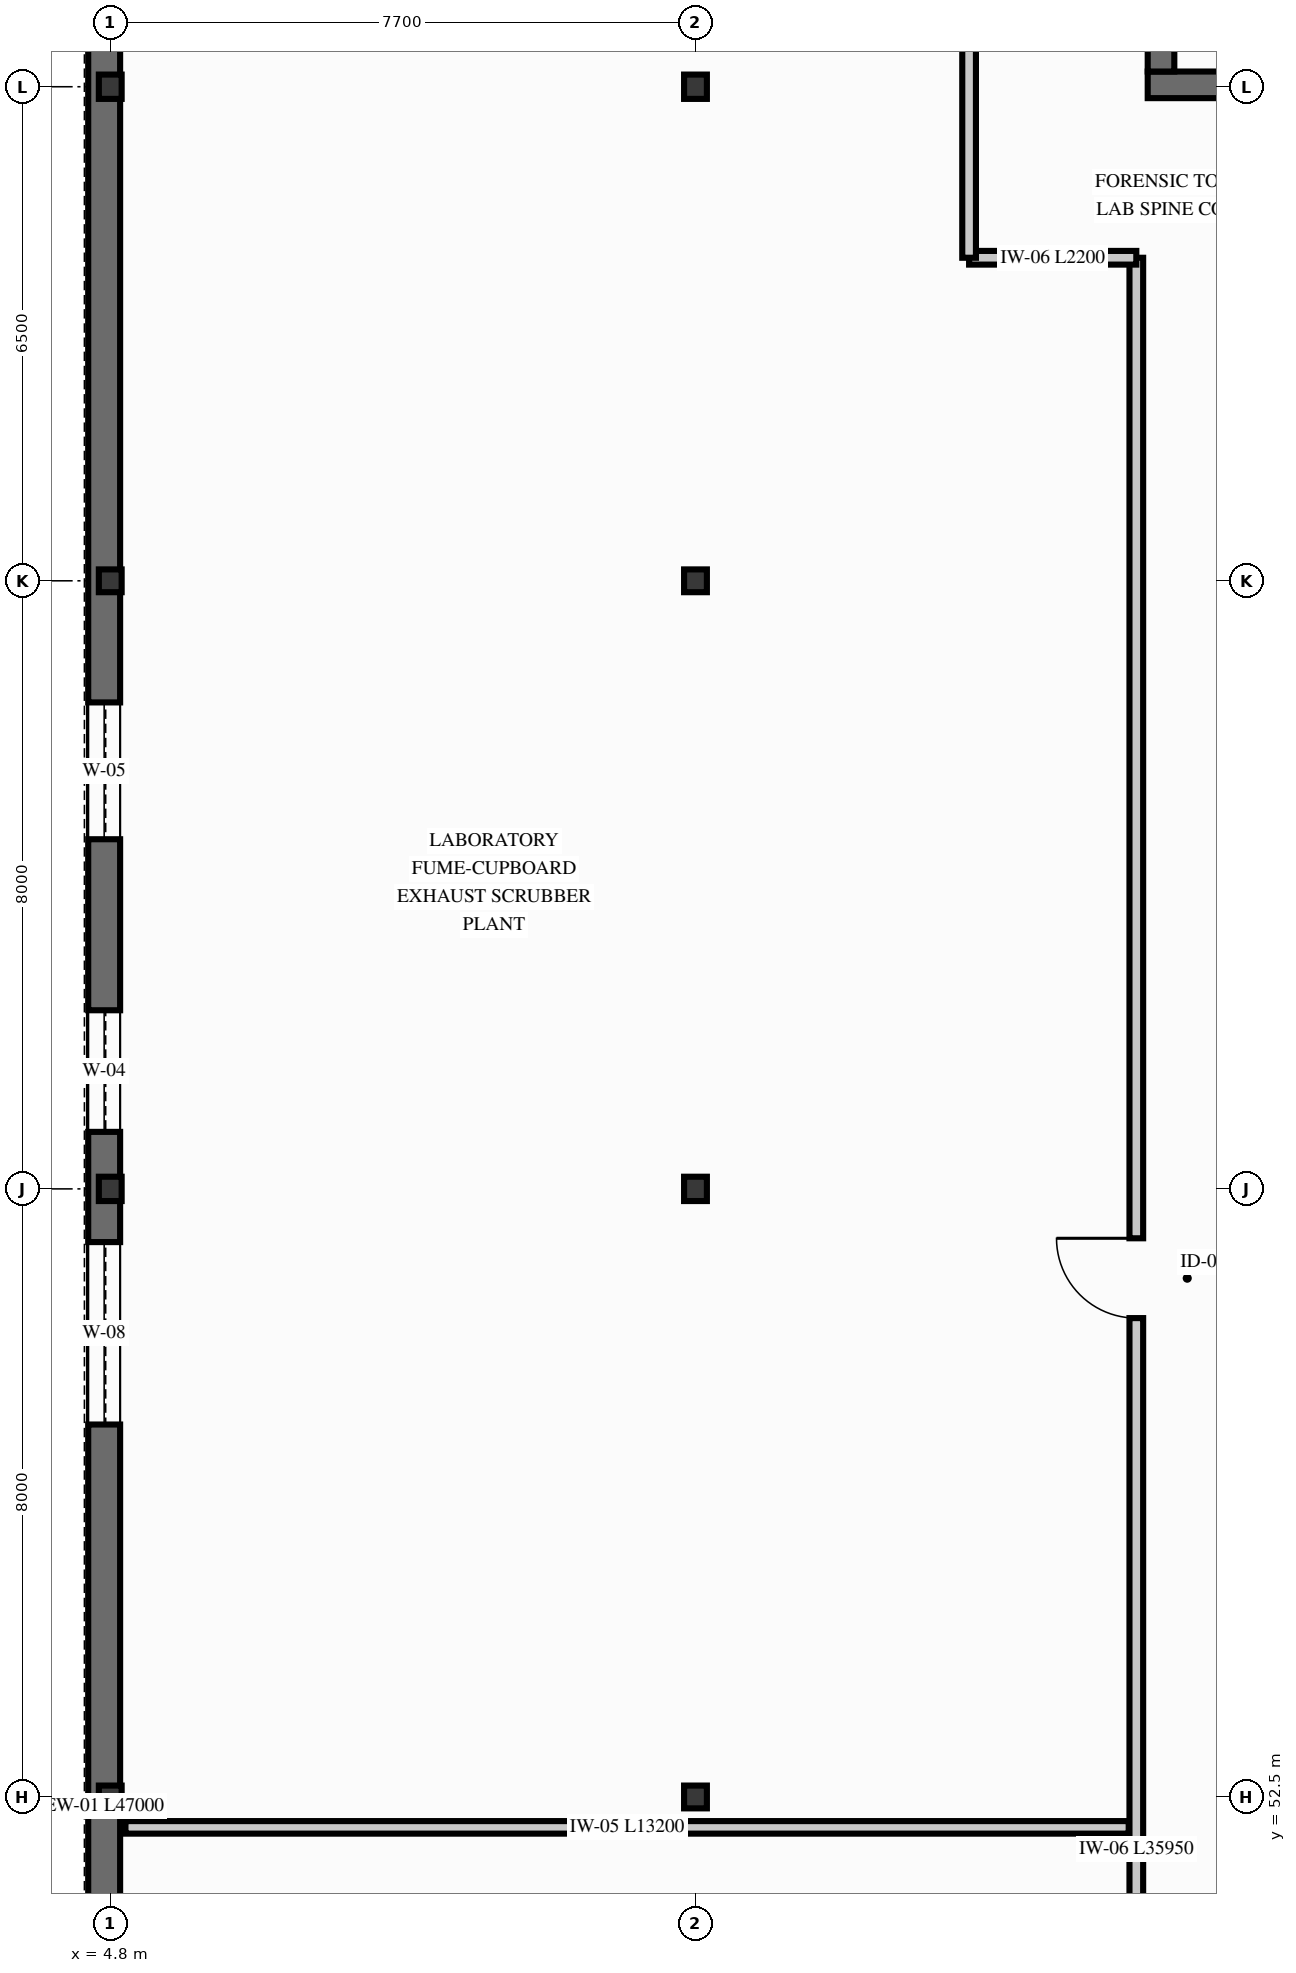
"""IFC4 building model, lengths in metres.
Left out: names, types, materials, properties, quantities, classifications, styles, units other than length and angle.
Written with IfcOpenShell. Run it as: python <this file> out.ifc"""

import sys

from ifc_helpers import new_model, si_unit, direction, frame, frame_2d, origin, origin_2d, place, context, subcontext, project, spatial, rectangle, i_section, extrude, element, fill, save


model = new_model("IFC4")
c1 = context("Model", 3, precision=1e-05, world=origin(), true_north=direction((0.0, 1.0)))
c2 = subcontext(c1, "Body", "Model", "MODEL_VIEW")
j1 = project(units=[si_unit("LENGTHUNIT", "METRE"), si_unit("PLANEANGLEUNIT", "RADIAN")], contexts=[c1])
p1 = place(None, origin())
s1 = spatial("IfcSite", under=j1, at=p1, CompositionType="ELEMENT")
p2 = place(p1, origin())
s2 = spatial("IfcBuilding", under=s1, at=p2, CompositionType="ELEMENT")
p3 = place(p2, frame((0.0, 0.0, 21.6)))
s3 = spatial("IfcBuildingStorey", under=s2, at=p3, CompositionType="ELEMENT", Elevation=21.6)
p4 = place(p3, frame((18.45, 75.025, 0.0), z_axis=(0.0, 0.0, 1.0), x_axis=(1.0, 0.0, 0.0)))
e1 = element("IfcWall", 1, at=p4, inside=s3, PredefinedType="SHEAR", context=c2, shape_type="SweptSolid", body=[
    extrude(rectangle(XDim=8.3, YDim=0.35, at=frame_2d((4.15, 0.0))), origin(), (0.0, 0.0, 1.0), 3.66),
])
p5 = place(p3, frame((18.625, 75.2, 0.0), z_axis=(0.0, 0.0, 1.0), x_axis=(0.0, 1.0, 0.0)))
e2 = element("IfcWall", 2, at=p5, inside=s3, PredefinedType="SHEAR", context=c2, shape_type="SweptSolid", body=[
    extrude(rectangle(XDim=6.8, YDim=0.35, at=frame_2d((3.4, 0.0))), origin(), (0.0, 0.0, 1.0), 3.66),
])
p6 = place(p5, frame((2.6, 0.0, 0.0)))
e3 = element("IfcOpeningElement", 3, at=p6, cuts=e2, PredefinedType="OPENING", context=c2, shape_type="SweptSolid", body=[
    extrude(rectangle(XDim=1.25, YDim=2.2, at=frame_2d((0.625, 1.1))), frame((0.0, 0.185, 0.0), z_axis=(0.0, -1.0, 0.0), x_axis=(1.0, 0.0, 0.0)), (0.0, 0.0, 1.0), 0.37),
])
p7 = place(p3, frame((4.8, 52.5, 0.0), z_axis=(0.0, 0.0, 1.0), x_axis=(1.0, 0.0, 0.0)))
e4 = element("IfcColumn", 4, at=p7, inside=s3, PredefinedType="COLUMN", context=c2, shape_type="SweptSolid", body=[
    extrude(i_section(OverallWidth=0.3, OverallDepth=0.3, WebThickness=0.011, FlangeThickness=0.019, FilletRadius=0.027, at=origin_2d()), origin(), (0.0, 0.0, 1.0), 3.68),
])
p8 = place(p3, frame((4.8, 60.5, 0.0), z_axis=(0.0, 0.0, 1.0), x_axis=(1.0, 0.0, 0.0)))
e5 = element("IfcColumn", 5, at=p8, inside=s3, PredefinedType="COLUMN", context=c2, shape_type="SweptSolid", body=[
    extrude(i_section(OverallWidth=0.3, OverallDepth=0.32, WebThickness=0.011, FlangeThickness=0.021, FilletRadius=0.027, at=origin_2d()), origin(), (0.0, 0.0, 1.0), 3.68),
])
p9 = place(p3, frame((4.8, 68.5, 0.0), z_axis=(0.0, 0.0, 1.0), x_axis=(1.0, 0.0, 0.0)))
e6 = element("IfcColumn", 6, at=p9, inside=s3, PredefinedType="COLUMN", context=c2, shape_type="SweptSolid", body=[
    extrude(i_section(OverallWidth=0.3, OverallDepth=0.3, WebThickness=0.011, FlangeThickness=0.019, FilletRadius=0.027, at=origin_2d()), origin(), (0.0, 0.0, 1.0), 3.68),
])
p10 = place(p3, frame((4.8, 75.0, 0.0), z_axis=(0.0, 0.0, 1.0), x_axis=(1.0, 0.0, 0.0)))
e7 = element("IfcColumn", 7, at=p10, inside=s3, PredefinedType="COLUMN", context=c2, shape_type="SweptSolid", body=[
    extrude(i_section(OverallWidth=0.3, OverallDepth=0.32, WebThickness=0.011, FlangeThickness=0.021, FilletRadius=0.027, at=origin_2d()), origin(), (0.0, 0.0, 1.0), 3.68),
])
p11 = place(p3, frame((12.5, 52.5, 0.0), z_axis=(0.0, 0.0, 1.0), x_axis=(1.0, 0.0, 0.0)))
e8 = element("IfcColumn", 8, at=p11, inside=s3, PredefinedType="COLUMN", context=c2, shape_type="SweptSolid", body=[
    extrude(i_section(OverallWidth=0.3, OverallDepth=0.3, WebThickness=0.011, FlangeThickness=0.019, FilletRadius=0.027, at=origin_2d()), origin(), (0.0, 0.0, 1.0), 3.68),
])
p12 = place(p3, frame((12.5, 60.5, 0.0), z_axis=(0.0, 0.0, 1.0), x_axis=(1.0, 0.0, 0.0)))
e9 = element("IfcColumn", 9, at=p12, inside=s3, PredefinedType="COLUMN", context=c2, shape_type="SweptSolid", body=[
    extrude(i_section(OverallWidth=0.3, OverallDepth=0.32, WebThickness=0.011, FlangeThickness=0.021, FilletRadius=0.027, at=origin_2d()), origin(), (0.0, 0.0, 1.0), 3.68),
])
p13 = place(p3, frame((12.5, 68.5, 0.0), z_axis=(0.0, 0.0, 1.0), x_axis=(1.0, 0.0, 0.0)))
e10 = element("IfcColumn", 10, at=p13, inside=s3, PredefinedType="COLUMN", context=c2, shape_type="SweptSolid", body=[
    extrude(i_section(OverallWidth=0.3, OverallDepth=0.3, WebThickness=0.011, FlangeThickness=0.019, FilletRadius=0.027, at=origin_2d()), origin(), (0.0, 0.0, 1.0), 3.68),
])
p14 = place(p3, frame((12.5, 75.0, 0.0), z_axis=(0.0, 0.0, 1.0), x_axis=(1.0, 0.0, 0.0)))
e11 = element("IfcColumn", 11, at=p14, inside=s3, PredefinedType="COLUMN", context=c2, shape_type="SweptSolid", body=[
    extrude(i_section(OverallWidth=0.3, OverallDepth=0.32, WebThickness=0.011, FlangeThickness=0.021, FilletRadius=0.027, at=origin_2d()), origin(), (0.0, 0.0, 1.0), 3.68),
])
p15 = place(p3, frame((4.72, 36.5, 0.0), z_axis=(0.0, 0.0, 1.0), x_axis=(0.0, 1.0, 0.0)))
e12 = element("IfcWall", 12, at=p15, inside=s3, PredefinedType="SOLIDWALL", context=c2, shape_type="SweptSolid", body=[
    extrude(rectangle(XDim=47.0, YDim=0.42, at=frame_2d((23.5, 0.0))), origin(), (0.0, 0.0, 1.0), 3.78),
])
p16 = place(p15, frame((1.65, 0.0, 0.74)))
e13 = element("IfcOpeningElement", 13, at=p16, cuts=e12, PredefinedType="OPENING", context=c2, shape_type="SweptSolid", body=[
    extrude(rectangle(XDim=1.6, YDim=2.4, at=frame_2d((0.8, 1.2))), frame((0.0, 0.22, 0.0), z_axis=(0.0, -1.0, 0.0), x_axis=(1.0, 0.0, 0.0)), (0.0, 0.0, 1.0), 0.44),
])
p17 = place(p15, frame((5.5, 0.0, 0.74)))
e14 = element("IfcOpeningElement", 14, at=p17, cuts=e12, PredefinedType="OPENING", context=c2, shape_type="SweptSolid", body=[
    extrude(rectangle(XDim=1.8, YDim=2.4, at=frame_2d((0.9, 1.2))), frame((0.0, 0.22, 0.0), z_axis=(0.0, -1.0, 0.0), x_axis=(1.0, 0.0, 0.0)), (0.0, 0.0, 1.0), 0.44),
])
p18 = place(p15, frame((9.35, 0.0, 0.84)))
e15 = element("IfcOpeningElement", 15, at=p18, cuts=e12, PredefinedType="OPENING", context=c2, shape_type="SweptSolid", body=[
    extrude(rectangle(XDim=1.5, YDim=2.3, at=frame_2d((0.75, 1.15))), frame((0.0, 0.22, 0.0), z_axis=(0.0, -1.0, 0.0), x_axis=(1.0, 0.0, 0.0)), (0.0, 0.0, 1.0), 0.44),
])
p19 = place(p15, frame((20.9, 0.0, 0.74)))
e16 = element("IfcOpeningElement", 16, at=p19, cuts=e12, PredefinedType="OPENING", context=c2, shape_type="SweptSolid", body=[
    extrude(rectangle(XDim=2.4, YDim=2.4, at=frame_2d((1.2, 1.2))), frame((0.0, 0.22, 0.0), z_axis=(0.0, -1.0, 0.0), x_axis=(1.0, 0.0, 0.0)), (0.0, 0.0, 1.0), 0.44),
])
p20 = place(p15, frame((24.75, 0.0, 0.74)))
e17 = element("IfcOpeningElement", 17, at=p20, cuts=e12, PredefinedType="OPENING", context=c2, shape_type="SweptSolid", body=[
    extrude(rectangle(XDim=1.6, YDim=2.4, at=frame_2d((0.8, 1.2))), frame((0.0, 0.22, 0.0), z_axis=(0.0, -1.0, 0.0), x_axis=(1.0, 0.0, 0.0)), (0.0, 0.0, 1.0), 0.44),
])
p21 = place(p15, frame((28.6, 0.0, 0.74)))
e18 = element("IfcOpeningElement", 18, at=p21, cuts=e12, PredefinedType="OPENING", context=c2, shape_type="SweptSolid", body=[
    extrude(rectangle(XDim=1.8, YDim=2.4, at=frame_2d((0.9, 1.2))), frame((0.0, 0.22, 0.0), z_axis=(0.0, -1.0, 0.0), x_axis=(1.0, 0.0, 0.0)), (0.0, 0.0, 1.0), 0.44),
])
p22 = place(p15, frame((40.15, 0.0, 0.54)))
e19 = element("IfcOpeningElement", 19, at=p22, cuts=e12, PredefinedType="OPENING", context=c2, shape_type="SweptSolid", body=[
    extrude(rectangle(XDim=2.2, YDim=2.6, at=frame_2d((1.1, 1.3))), frame((0.0, 0.22, 0.0), z_axis=(0.0, -1.0, 0.0), x_axis=(1.0, 0.0, 0.0)), (0.0, 0.0, 1.0), 0.44),
])
p23 = place(p3, frame((18.3, 36.8, 0.0), z_axis=(0.0, 0.0, 1.0), x_axis=(0.0, 1.0, 0.0)))
e20 = element("IfcWall", 20, at=p23, inside=s3, PredefinedType="PARTITIONING", context=c2, shape_type="SweptSolid", body=[
    extrude(rectangle(XDim=35.95, YDim=0.18, at=frame_2d((17.975, 0.0))), origin(), (0.0, 0.0, 1.0), 3.62),
])
p24 = place(p23, frame((7.0, 0.0, 0.0)))
e21 = element("IfcOpeningElement", 21, at=p24, cuts=e20, PredefinedType="OPENING", context=c2, shape_type="SweptSolid", body=[
    extrude(rectangle(XDim=1.02, YDim=2.18, at=frame_2d((0.51, 1.09))), frame((0.0, 0.1, 0.0), z_axis=(0.0, -1.0, 0.0), x_axis=(1.0, 0.0, 0.0)), (0.0, 0.0, 1.0), 0.2),
])
p25 = place(p23, frame((22.0, 0.0, 0.0)))
e22 = element("IfcOpeningElement", 22, at=p25, cuts=e20, PredefinedType="OPENING", context=c2, shape_type="SweptSolid", body=[
    extrude(rectangle(XDim=1.05, YDim=2.2, at=frame_2d((0.525, 1.1))), frame((0.0, 0.1, 0.0), z_axis=(0.0, -1.0, 0.0), x_axis=(1.0, 0.0, 0.0)), (0.0, 0.0, 1.0), 0.2),
])
p26 = place(p3, frame((16.1, 72.75, 0.0), z_axis=(0.0, 0.0, 1.0), x_axis=(1.0, 0.0, 0.0)))
e23 = element("IfcWall", 23, at=p26, inside=s3, PredefinedType="PARTITIONING", context=c2, shape_type="SweptSolid", body=[
    extrude(rectangle(XDim=2.2, YDim=0.18, at=frame_2d((1.1, 0.0))), origin(), (0.0, 0.0, 1.0), 3.62),
])
p27 = place(p3, frame((16.1, 72.75, 0.0), z_axis=(0.0, 0.0, 1.0), x_axis=(0.0, 1.0, 0.0)))
e24 = element("IfcWall", 24, at=p27, inside=s3, PredefinedType="PARTITIONING", context=c2, shape_type="SweptSolid", body=[
    extrude(rectangle(XDim=10.3, YDim=0.18, at=frame_2d((5.15, 0.0))), origin(), (0.0, 0.0, 1.0), 3.62),
])
p28 = place(p27, frame((4.5, 0.0, 0.0)))
e25 = element("IfcOpeningElement", 25, at=p28, cuts=e24, PredefinedType="OPENING", context=c2, shape_type="SweptSolid", body=[
    extrude(rectangle(XDim=1.05, YDim=2.2, at=frame_2d((0.525, 1.1))), frame((0.0, 0.1, 0.0), z_axis=(0.0, -1.0, 0.0), x_axis=(1.0, 0.0, 0.0)), (0.0, 0.0, 1.0), 0.2),
])
p29 = place(p3, frame((5.0, 52.1, 0.0), z_axis=(0.0, 0.0, 1.0), x_axis=(1.0, 0.0, 0.0)))
e26 = element("IfcWall", 26, at=p29, inside=s3, PredefinedType="PARTITIONING", context=c2, shape_type="SweptSolid", body=[
    extrude(rectangle(XDim=13.2, YDim=0.165, at=frame_2d((6.6, 0.0))), origin(), (0.0, 0.0, 1.0), 3.62),
])
p30 = place(p19, origin())
e27 = element("IfcWindow", 27, at=p30, inside=s3, PartitioningType="SINGLE_PANEL", PredefinedType="WINDOW", context=c2, shape_type="SweptSolid", body=[
    extrude(rectangle(XDim=2.4, YDim=2.4, at=frame_2d((1.2, 1.2))), frame((0.0, 0.03, 0.0), z_axis=(0.0, -1.0, 0.0), x_axis=(1.0, 0.0, 0.0)), (0.0, 0.0, 1.0), 0.06),
])
fill(e16, e27)
p31 = place(p20, origin())
e28 = element("IfcWindow", 28, at=p31, inside=s3, PartitioningType="SINGLE_PANEL", PredefinedType="WINDOW", context=c2, shape_type="SweptSolid", body=[
    extrude(rectangle(XDim=1.6, YDim=2.4, at=frame_2d((0.8, 1.2))), frame((0.0, 0.03, 0.0), z_axis=(0.0, -1.0, 0.0), x_axis=(1.0, 0.0, 0.0)), (0.0, 0.0, 1.0), 0.06),
])
fill(e17, e28)
p32 = place(p21, origin())
e29 = element("IfcWindow", 29, at=p32, inside=s3, PartitioningType="SINGLE_PANEL", PredefinedType="WINDOW", context=c2, shape_type="SweptSolid", body=[
    extrude(rectangle(XDim=1.8, YDim=2.4, at=frame_2d((0.9, 1.2))), frame((0.0, 0.03, 0.0), z_axis=(0.0, -1.0, 0.0), x_axis=(1.0, 0.0, 0.0)), (0.0, 0.0, 1.0), 0.06),
])
fill(e18, e29)
p33 = place(p25, origin())
e30 = element("IfcDoor", 30, at=p33, inside=s3, OperationType="SINGLE_SWING_RIGHT", PredefinedType="DOOR", context=c2, shape_type="SweptSolid", body=[
    extrude(rectangle(XDim=1.05, YDim=2.2, at=frame_2d((0.525, 1.1))), frame((0.0, 0.025, 0.0), z_axis=(0.0, -1.0, 0.0), x_axis=(1.0, 0.0, 0.0)), (0.0, 0.0, 1.0), 0.05),
])
fill(e22, e30)
save(model, sys.argv[1])
